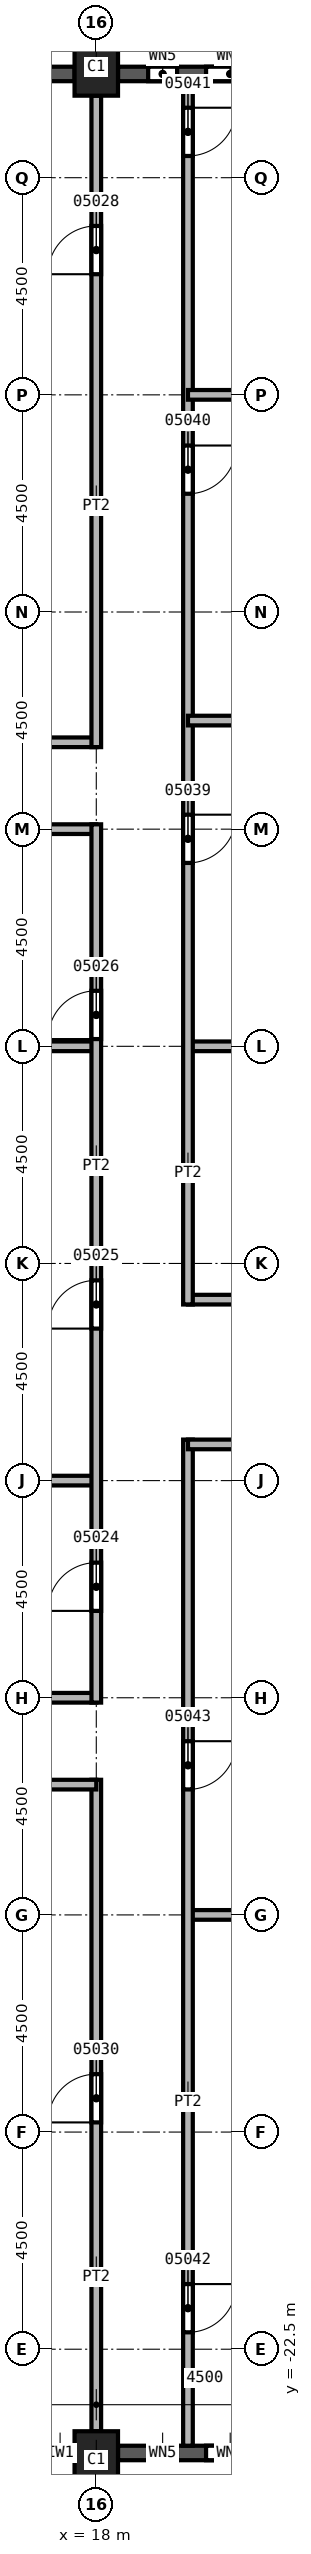
"""IFC4 building model, lengths in metres.
Left out: names, types, materials, properties, quantities, classifications, styles, units other than length and angle.
Written with IfcOpenShell. Run it as: python <this file> out.ifc"""

import sys

from ifc_helpers import new_model, si_unit, direction, frame, frame_2d, origin, origin_2d, place, context, subcontext, project, spatial, rectangle, extrude, element, fill, save


model = new_model("IFC4")
c1 = context("Model", 3, precision=1e-05, world=origin(), true_north=direction((0.0, 1.0)))
c2 = subcontext(c1, "Body", "Model", "MODEL_VIEW")
j1 = project(units=[si_unit("LENGTHUNIT", "METRE"), si_unit("PLANEANGLEUNIT", "RADIAN")], contexts=[c1])
p1 = place(None, origin())
s1 = spatial("IfcSite", under=j1, at=p1, CompositionType="ELEMENT")
p2 = place(p1, origin())
s2 = spatial("IfcBuilding", under=s1, at=p2, CompositionType="ELEMENT")
p3 = place(p2, frame((0.0, 0.0, 112.0)))
s3 = spatial("IfcBuildingStorey", under=s2, at=p3, CompositionType="ELEMENT", Elevation=112.0)
for number, where, z_axis, x_axis in (
    (1, (18.0, 24.8, 0.0), (0.0, 0.0, 1.0), (1.0, 0.0, 0.0)),
    (2, (18.0, -24.8, 0.0), (0.0, 0.0, 1.0), (1.0, 0.0, 0.0)),
):
    element("IfcColumn", number, at=place(p3, frame(where, z_axis=z_axis, x_axis=x_axis)), inside=s3, PredefinedType="COLUMN", context=c2, shape_type="SweptSolid", body=[
        extrude(rectangle(XDim=0.9, YDim=1.2, at=origin_2d()), origin(), (0.0, 0.0, 1.0), 3.7),
    ])
p4 = place(p3, frame((13.95, -24.65, 0.0), z_axis=(0.0, 0.0, 1.0), x_axis=(1.0, 0.0, 0.0)))
e3 = element("IfcWall", 3, at=p4, inside=s3, PredefinedType="SOLIDWALL", context=c2, shape_type="SweptSolid", body=[
    extrude(rectangle(XDim=3.6, YDim=0.3, at=frame_2d((1.8, 0.0))), origin(), (0.0, 0.0, 1.0), 3.1),
])
p5 = place(p4, frame((0.6, 0.0, 0.8)))
e4 = element("IfcOpeningElement", 4, at=p5, cuts=e3, PredefinedType="OPENING", context=c2, shape_type="SweptSolid", body=[
    extrude(rectangle(XDim=2.4, YDim=1.95, at=frame_2d((1.2, 0.975))), frame((0.0, 0.15, 0.0), z_axis=(0.0, -1.0, 0.0), x_axis=(1.0, 0.0, 0.0)), (0.0, 0.0, 1.0), 0.3),
])
p6 = place(p3, frame((18.45, -24.65, 0.0), z_axis=(0.0, 0.0, 1.0), x_axis=(1.0, 0.0, 0.0)))
e5 = element("IfcWall", 5, at=p6, inside=s3, PredefinedType="SOLIDWALL", context=c2, shape_type="SweptSolid", body=[
    extrude(rectangle(XDim=3.6, YDim=0.3, at=frame_2d((1.8, 0.0))), origin(), (0.0, 0.0, 1.0), 3.1),
])
p7 = place(p6, frame((0.625, 0.0, 0.8)))
e6 = element("IfcOpeningElement", 6, at=p7, cuts=e5, PredefinedType="OPENING", context=c2, shape_type="SweptSolid", body=[
    extrude(rectangle(XDim=0.6, YDim=1.95, at=frame_2d((0.3, 0.975))), frame((0.0, 0.15, 0.0), z_axis=(0.0, -1.0, 0.0), x_axis=(1.0, 0.0, 0.0)), (0.0, 0.0, 1.0), 0.3),
])
p8 = place(p6, frame((1.825, 0.0, 0.8)))
e7 = element("IfcOpeningElement", 7, at=p8, cuts=e5, PredefinedType="OPENING", context=c2, shape_type="SweptSolid", body=[
    extrude(rectangle(XDim=1.0, YDim=1.95, at=frame_2d((0.5, 0.975))), frame((0.0, 0.15, 0.0), z_axis=(0.0, -1.0, 0.0), x_axis=(1.0, 0.0, 0.0)), (0.0, 0.0, 1.0), 0.3),
])
p9 = place(p3, frame((22.05, 24.65, 0.0), z_axis=(0.0, 0.0, 1.0), x_axis=(-1.0, 0.0, 0.0)))
e8 = element("IfcWall", 8, at=p9, inside=s3, PredefinedType="SOLIDWALL", context=c2, shape_type="SweptSolid", body=[
    extrude(rectangle(XDim=3.6, YDim=0.3, at=frame_2d((1.8, 0.0))), origin(), (0.0, 0.0, 1.0), 3.1),
])
p10 = place(p9, frame((0.775, 0.0, 0.8)))
e9 = element("IfcOpeningElement", 9, at=p10, cuts=e8, PredefinedType="OPENING", context=c2, shape_type="SweptSolid", body=[
    extrude(rectangle(XDim=1.0, YDim=1.95, at=frame_2d((0.5, 0.975))), frame((0.0, 0.15, 0.0), z_axis=(0.0, -1.0, 0.0), x_axis=(1.0, 0.0, 0.0)), (0.0, 0.0, 1.0), 0.3),
])
p11 = place(p9, frame((2.375, 0.0, 0.8)))
e10 = element("IfcOpeningElement", 10, at=p11, cuts=e8, PredefinedType="OPENING", context=c2, shape_type="SweptSolid", body=[
    extrude(rectangle(XDim=0.6, YDim=1.95, at=frame_2d((0.3, 0.975))), frame((0.0, 0.15, 0.0), z_axis=(0.0, -1.0, 0.0), x_axis=(1.0, 0.0, 0.0)), (0.0, 0.0, 1.0), 0.3),
])
p12 = place(p3, frame((17.55, 24.65, 0.0), z_axis=(0.0, 0.0, 1.0), x_axis=(-1.0, 0.0, 0.0)))
e11 = element("IfcWall", 11, at=p12, inside=s3, PredefinedType="SOLIDWALL", context=c2, shape_type="SweptSolid", body=[
    extrude(rectangle(XDim=3.6, YDim=0.3, at=frame_2d((1.8, 0.0))), origin(), (0.0, 0.0, 1.0), 3.1),
])
p13 = place(p12, frame((0.6, 0.0, 0.8)))
e12 = element("IfcOpeningElement", 12, at=p13, cuts=e11, PredefinedType="OPENING", context=c2, shape_type="SweptSolid", body=[
    extrude(rectangle(XDim=2.4, YDim=1.95, at=frame_2d((1.2, 0.975))), frame((0.0, 0.15, 0.0), z_axis=(0.0, -1.0, 0.0), x_axis=(1.0, 0.0, 0.0)), (0.0, 0.0, 1.0), 0.3),
])
for number, where, z_axis, x_axis in (
    (13, (13.5, -9.0, 0.0), (0.0, 0.0, 1.0), (1.0, 0.0, 0.0)),
    (14, (13.5, -4.5, 0.0), (0.0, 0.0, 1.0), (1.0, 0.0, 0.0)),
    (15, (13.5, 4.5, 0.0), (0.0, 0.0, 1.0), (1.0, 0.0, 0.0)),
    (16, (18.0, 9.0, 0.0), (0.0, 0.0, 1.0), (-1.0, 0.0, 0.0)),
):
    element("IfcWall", number, at=place(p3, frame(where, z_axis=z_axis, x_axis=x_axis)), inside=s3, PredefinedType="PARTITIONING", context=c2, shape_type="SweptSolid", body=[
        extrude(rectangle(XDim=4.5, YDim=0.2, at=frame_2d((2.25, 0.0))), origin(), (0.0, 0.0, 1.0), 3.7),
    ])
p14 = place(p3, frame((14.4, 10.8, 0.0), z_axis=(0.0, 0.0, 1.0), x_axis=(1.0, 0.0, 0.0)))
e17 = element("IfcWall", 17, at=p14, inside=s3, PredefinedType="PARTITIONING", context=c2, shape_type="SweptSolid", body=[
    extrude(rectangle(XDim=3.6, YDim=0.2, at=frame_2d((1.8, 0.0))), origin(), (0.0, 0.0, 1.0), 3.7),
])
p15 = place(p3, frame((18.0, -24.2, 0.0), z_axis=(0.0, 0.0, 1.0), x_axis=(0.0, 1.0, 0.0)))
e18 = element("IfcWall", 18, at=p15, inside=s3, PredefinedType="PARTITIONING", context=c2, shape_type="SweptSolid", body=[
    extrude(rectangle(XDim=13.5, YDim=0.2, at=frame_2d((6.75, 0.0))), origin(), (0.0, 0.0, 1.0), 3.7),
])
p16 = place(p15, frame((6.4, 0.0, 0.0)))
e19 = element("IfcOpeningElement", 19, at=p16, cuts=e18, PredefinedType="OPENING", context=c2, shape_type="SweptSolid", body=[
    extrude(rectangle(XDim=1.0, YDim=2.1, at=frame_2d((0.5, 1.05))), frame((0.0, 0.1, 0.0), z_axis=(0.0, -1.0, 0.0), x_axis=(1.0, 0.0, 0.0)), (0.0, 0.0, 1.0), 0.2),
])
p17 = place(p3, frame((18.0, -10.8, 0.0), z_axis=(0.0, 0.0, 1.0), x_axis=(-1.0, 0.0, 0.0)))
e20 = element("IfcWall", 20, at=p17, inside=s3, PredefinedType="PARTITIONING", context=c2, shape_type="SweptSolid", body=[
    extrude(rectangle(XDim=3.6, YDim=0.2, at=frame_2d((1.8, 0.0))), origin(), (0.0, 0.0, 1.0), 3.7),
])
p18 = place(p3, frame((18.0, -9.1, 0.0), z_axis=(0.0, 0.0, 1.0), x_axis=(0.0, 1.0, 0.0)))
e21 = element("IfcWall", 21, at=p18, inside=s3, PredefinedType="PARTITIONING", context=c2, shape_type="SweptSolid", body=[
    extrude(rectangle(XDim=18.2, YDim=0.2, at=frame_2d((9.1, 0.0))), origin(), (0.0, 0.0, 1.0), 3.7),
])
p19 = place(p18, frame((1.9, 0.0, 0.0)))
e22 = element("IfcOpeningElement", 22, at=p19, cuts=e21, PredefinedType="OPENING", context=c2, shape_type="SweptSolid", body=[
    extrude(rectangle(XDim=1.0, YDim=2.1, at=frame_2d((0.5, 1.05))), frame((0.0, 0.1, 0.0), z_axis=(0.0, -1.0, 0.0), x_axis=(1.0, 0.0, 0.0)), (0.0, 0.0, 1.0), 0.2),
])
p20 = place(p18, frame((7.75, 0.0, 0.0)))
e23 = element("IfcOpeningElement", 23, at=p20, cuts=e21, PredefinedType="OPENING", context=c2, shape_type="SweptSolid", body=[
    extrude(rectangle(XDim=1.0, YDim=2.1, at=frame_2d((0.5, 1.05))), frame((0.0, 0.1, 0.0), z_axis=(0.0, -1.0, 0.0), x_axis=(1.0, 0.0, 0.0)), (0.0, 0.0, 1.0), 0.2),
])
p21 = place(p18, frame((13.75, 0.0, 0.0)))
e24 = element("IfcOpeningElement", 24, at=p21, cuts=e21, PredefinedType="OPENING", context=c2, shape_type="SweptSolid", body=[
    extrude(rectangle(XDim=1.0, YDim=2.1, at=frame_2d((0.5, 1.05))), frame((0.0, 0.1, 0.0), z_axis=(0.0, -1.0, 0.0), x_axis=(1.0, 0.0, 0.0)), (0.0, 0.0, 1.0), 0.2),
])
p22 = place(p3, frame((18.0, 10.7, 0.0), z_axis=(0.0, 0.0, 1.0), x_axis=(0.0, 1.0, 0.0)))
e25 = element("IfcWall", 25, at=p22, inside=s3, PredefinedType="PARTITIONING", context=c2, shape_type="SweptSolid", body=[
    extrude(rectangle(XDim=13.5, YDim=0.2, at=frame_2d((6.75, 0.0))), origin(), (0.0, 0.0, 1.0), 3.7),
])
p23 = place(p22, frame((9.8, 0.0, 0.0)))
e26 = element("IfcOpeningElement", 26, at=p23, cuts=e25, PredefinedType="OPENING", context=c2, shape_type="SweptSolid", body=[
    extrude(rectangle(XDim=1.0, YDim=2.1, at=frame_2d((0.5, 1.05))), frame((0.0, 0.1, 0.0), z_axis=(0.0, -1.0, 0.0), x_axis=(1.0, 0.0, 0.0)), (0.0, 0.0, 1.0), 0.2),
])
p24 = place(p3, frame((19.9, -13.5, 0.0), z_axis=(0.0, 0.0, 1.0), x_axis=(1.0, 0.0, 0.0)))
e27 = element("IfcWall", 27, at=p24, inside=s3, PredefinedType="PARTITIONING", context=c2, shape_type="SweptSolid", body=[
    extrude(rectangle(XDim=7.2, YDim=0.2, at=frame_2d((3.6, 0.0))), origin(), (0.0, 0.0, 1.0), 3.7),
])
p25 = place(p3, frame((19.9, -3.65, 0.0), z_axis=(0.0, 0.0, 1.0), x_axis=(0.0, -1.0, 0.0)))
e28 = element("IfcWall", 28, at=p25, inside=s3, PredefinedType="PARTITIONING", context=c2, shape_type="SweptSolid", body=[
    extrude(rectangle(XDim=20.85, YDim=0.2, at=frame_2d((10.425, 0.0))), origin(), (0.0, 0.0, 1.0), 3.7),
])
p26 = place(p25, frame((17.5, 0.0, 0.0)))
e29 = element("IfcOpeningElement", 29, at=p26, cuts=e28, PredefinedType="OPENING", context=c2, shape_type="SweptSolid", body=[
    extrude(rectangle(XDim=1.0, YDim=2.1, at=frame_2d((0.5, 1.05))), frame((0.0, 0.1, 0.0), z_axis=(0.0, -1.0, 0.0), x_axis=(1.0, 0.0, 0.0)), (0.0, 0.0, 1.0), 0.2),
])
p27 = place(p25, frame((6.25, 0.0, 0.0)))
e30 = element("IfcOpeningElement", 30, at=p27, cuts=e28, PredefinedType="OPENING", context=c2, shape_type="SweptSolid", body=[
    extrude(rectangle(XDim=1.0, YDim=2.1, at=frame_2d((0.5, 1.05))), frame((0.0, 0.1, 0.0), z_axis=(0.0, -1.0, 0.0), x_axis=(1.0, 0.0, 0.0)), (0.0, 0.0, 1.0), 0.2),
])
p28 = place(p3, frame((19.9, -0.75, 0.0), z_axis=(0.0, 0.0, 1.0), x_axis=(1.0, 0.0, 0.0)))
e31 = element("IfcWall", 31, at=p28, inside=s3, PredefinedType="PARTITIONING", context=c2, shape_type="SweptSolid", body=[
    extrude(rectangle(XDim=13.95, YDim=0.2, at=frame_2d((6.975, 0.0))), origin(), (0.0, 0.0, 1.0), 3.7),
])
p29 = place(p28, frame((3.4, 0.0, 0.0)))
e32 = element("IfcOpeningElement", 32, at=p29, cuts=e31, PredefinedType="OPENING", context=c2, shape_type="SweptSolid", body=[
    extrude(rectangle(XDim=1.0, YDim=2.1, at=frame_2d((0.5, 1.05))), frame((0.0, 0.1, 0.0), z_axis=(0.0, -1.0, 0.0), x_axis=(1.0, 0.0, 0.0)), (0.0, 0.0, 1.0), 0.2),
])
p30 = place(p3, frame((19.9, 4.5, 0.0), z_axis=(0.0, 0.0, 1.0), x_axis=(1.0, 0.0, 0.0)))
e33 = element("IfcWall", 33, at=p30, inside=s3, PredefinedType="PARTITIONING", context=c2, shape_type="SweptSolid", body=[
    extrude(rectangle(XDim=7.2, YDim=0.2, at=frame_2d((3.6, 0.0))), origin(), (0.0, 0.0, 1.0), 3.7),
])
p31 = place(p3, frame((19.9, 24.5, 0.0), z_axis=(0.0, 0.0, 1.0), x_axis=(0.0, -1.0, 0.0)))
e34 = element("IfcWall", 34, at=p31, inside=s3, PredefinedType="PARTITIONING", context=c2, shape_type="SweptSolid", body=[
    extrude(rectangle(XDim=25.35, YDim=0.2, at=frame_2d((12.675, 0.0))), origin(), (0.0, 0.0, 1.0), 3.7),
])
p32 = place(p31, frame((15.2, 0.0, 0.0)))
e35 = element("IfcOpeningElement", 35, at=p32, cuts=e34, PredefinedType="OPENING", context=c2, shape_type="SweptSolid", body=[
    extrude(rectangle(XDim=1.0, YDim=2.1, at=frame_2d((0.5, 1.05))), frame((0.0, 0.1, 0.0), z_axis=(0.0, -1.0, 0.0), x_axis=(1.0, 0.0, 0.0)), (0.0, 0.0, 1.0), 0.2),
])
p33 = place(p31, frame((7.55, 0.0, 0.0)))
e36 = element("IfcOpeningElement", 36, at=p33, cuts=e34, PredefinedType="OPENING", context=c2, shape_type="SweptSolid", body=[
    extrude(rectangle(XDim=1.0, YDim=2.1, at=frame_2d((0.5, 1.05))), frame((0.0, 0.1, 0.0), z_axis=(0.0, -1.0, 0.0), x_axis=(1.0, 0.0, 0.0)), (0.0, 0.0, 1.0), 0.2),
])
p34 = place(p31, frame((0.55, 0.0, 0.0)))
e37 = element("IfcOpeningElement", 37, at=p34, cuts=e34, PredefinedType="OPENING", context=c2, shape_type="SweptSolid", body=[
    extrude(rectangle(XDim=1.0, YDim=2.1, at=frame_2d((0.5, 1.05))), frame((0.0, 0.1, 0.0), z_axis=(0.0, -1.0, 0.0), x_axis=(1.0, 0.0, 0.0)), (0.0, 0.0, 1.0), 0.2),
])
p35 = place(p3, frame((19.9, 11.25, 0.0), z_axis=(0.0, 0.0, 1.0), x_axis=(1.0, 0.0, 0.0)))
e38 = element("IfcWall", 38, at=p35, inside=s3, PredefinedType="PARTITIONING", context=c2, shape_type="SweptSolid", body=[
    extrude(rectangle(XDim=7.2, YDim=0.2, at=frame_2d((3.6, 0.0))), origin(), (0.0, 0.0, 1.0), 3.7),
])
p36 = place(p3, frame((19.9, 18.0, 0.0), z_axis=(0.0, 0.0, 1.0), x_axis=(1.0, 0.0, 0.0)))
e39 = element("IfcWall", 39, at=p36, inside=s3, PredefinedType="PARTITIONING", context=c2, shape_type="SweptSolid", body=[
    extrude(rectangle(XDim=4.25, YDim=0.2, at=frame_2d((2.125, 0.0))), origin(), (0.0, 0.0, 1.0), 3.7),
])
p37 = place(p3, frame((33.85, -3.75, 0.0), z_axis=(0.0, 0.0, 1.0), x_axis=(-1.0, 0.0, 0.0)))
e40 = element("IfcWall", 40, at=p37, inside=s3, PredefinedType="PARTITIONING", context=c2, shape_type="SweptSolid", body=[
    extrude(rectangle(XDim=13.95, YDim=0.2, at=frame_2d((6.975, 0.0))), origin(), (0.0, 0.0, 1.0), 3.7),
])
p38 = place(p19, origin())
e41 = element("IfcDoor", 41, at=p38, inside=s3, OperationType="SINGLE_SWING_LEFT", PredefinedType="DOOR", context=c2, shape_type="SweptSolid", body=[
    extrude(rectangle(XDim=1.0, YDim=2.1, at=frame_2d((0.5, 1.05))), frame((0.0, 0.025, 0.0), z_axis=(0.0, -1.0, 0.0), x_axis=(1.0, 0.0, 0.0)), (0.0, 0.0, 1.0), 0.05),
])
fill(e22, e41)
p39 = place(p20, origin())
e42 = element("IfcDoor", 42, at=p39, inside=s3, OperationType="SINGLE_SWING_RIGHT", PredefinedType="DOOR", context=c2, shape_type="SweptSolid", body=[
    extrude(rectangle(XDim=1.0, YDim=2.1, at=frame_2d((0.5, 1.05))), frame((0.0, 0.025, 0.0), z_axis=(0.0, -1.0, 0.0), x_axis=(1.0, 0.0, 0.0)), (0.0, 0.0, 1.0), 0.05),
])
fill(e23, e42)
p40 = place(p21, origin())
e43 = element("IfcDoor", 43, at=p40, inside=s3, OperationType="SINGLE_SWING_LEFT", PredefinedType="DOOR", context=c2, shape_type="SweptSolid", body=[
    extrude(rectangle(XDim=1.0, YDim=2.1, at=frame_2d((0.5, 1.05))), frame((0.0, 0.025, 0.0), z_axis=(0.0, -1.0, 0.0), x_axis=(1.0, 0.0, 0.0)), (0.0, 0.0, 1.0), 0.05),
])
fill(e24, e43)
p41 = place(p23, origin())
e44 = element("IfcDoor", 44, at=p41, inside=s3, OperationType="SINGLE_SWING_LEFT", PredefinedType="DOOR", context=c2, shape_type="SweptSolid", body=[
    extrude(rectangle(XDim=1.0, YDim=2.1, at=frame_2d((0.5, 1.05))), frame((0.0, 0.025, 0.0), z_axis=(0.0, -1.0, 0.0), x_axis=(1.0, 0.0, 0.0)), (0.0, 0.0, 1.0), 0.05),
])
fill(e26, e44)
p42 = place(p16, origin())
e45 = element("IfcDoor", 45, at=p42, inside=s3, OperationType="SINGLE_SWING_LEFT", PredefinedType="DOOR", context=c2, shape_type="SweptSolid", body=[
    extrude(rectangle(XDim=1.0, YDim=2.1, at=frame_2d((0.5, 1.05))), frame((0.0, 0.025, 0.0), z_axis=(0.0, -1.0, 0.0), x_axis=(1.0, 0.0, 0.0)), (0.0, 0.0, 1.0), 0.05),
])
fill(e19, e45)
p43 = place(p32, origin())
e46 = element("IfcDoor", 46, at=p43, inside=s3, OperationType="SINGLE_SWING_RIGHT", PredefinedType="DOOR", context=c2, shape_type="SweptSolid", body=[
    extrude(rectangle(XDim=1.0, YDim=2.1, at=frame_2d((0.5, 1.05))), frame((0.0, 0.025, 0.0), z_axis=(0.0, -1.0, 0.0), x_axis=(1.0, 0.0, 0.0)), (0.0, 0.0, 1.0), 0.05),
])
fill(e35, e46)
p44 = place(p33, origin())
e47 = element("IfcDoor", 47, at=p44, inside=s3, OperationType="SINGLE_SWING_LEFT", PredefinedType="DOOR", context=c2, shape_type="SweptSolid", body=[
    extrude(rectangle(XDim=1.0, YDim=2.1, at=frame_2d((0.5, 1.05))), frame((0.0, 0.025, 0.0), z_axis=(0.0, -1.0, 0.0), x_axis=(1.0, 0.0, 0.0)), (0.0, 0.0, 1.0), 0.05),
])
fill(e36, e47)
p45 = place(p34, origin())
e48 = element("IfcDoor", 48, at=p45, inside=s3, OperationType="SINGLE_SWING_RIGHT", PredefinedType="DOOR", context=c2, shape_type="SweptSolid", body=[
    extrude(rectangle(XDim=1.0, YDim=2.1, at=frame_2d((0.5, 1.05))), frame((0.0, 0.025, 0.0), z_axis=(0.0, -1.0, 0.0), x_axis=(1.0, 0.0, 0.0)), (0.0, 0.0, 1.0), 0.05),
])
fill(e37, e48)
p46 = place(p26, origin())
e49 = element("IfcDoor", 49, at=p46, inside=s3, OperationType="SINGLE_SWING_LEFT", PredefinedType="DOOR", context=c2, shape_type="SweptSolid", body=[
    extrude(rectangle(XDim=1.0, YDim=2.1, at=frame_2d((0.5, 1.05))), frame((0.0, 0.025, 0.0), z_axis=(0.0, -1.0, 0.0), x_axis=(1.0, 0.0, 0.0)), (0.0, 0.0, 1.0), 0.05),
])
fill(e29, e49)
p47 = place(p27, origin())
e50 = element("IfcDoor", 50, at=p47, inside=s3, OperationType="SINGLE_SWING_RIGHT", PredefinedType="DOOR", context=c2, shape_type="SweptSolid", body=[
    extrude(rectangle(XDim=1.0, YDim=2.1, at=frame_2d((0.5, 1.05))), frame((0.0, 0.025, 0.0), z_axis=(0.0, -1.0, 0.0), x_axis=(1.0, 0.0, 0.0)), (0.0, 0.0, 1.0), 0.05),
])
fill(e30, e50)
p48 = place(p7, origin())
e51 = element("IfcWindow", 51, at=p48, inside=s3, PartitioningType="SINGLE_PANEL", PredefinedType="WINDOW", context=c2, shape_type="SweptSolid", body=[
    extrude(rectangle(XDim=0.6, YDim=1.95, at=frame_2d((0.3, 0.975))), frame((0.0, 0.03, 0.0), z_axis=(0.0, -1.0, 0.0), x_axis=(1.0, 0.0, 0.0)), (0.0, 0.0, 1.0), 0.06),
])
fill(e6, e51)
p49 = place(p8, origin())
e52 = element("IfcWindow", 52, at=p49, inside=s3, PartitioningType="SINGLE_PANEL", PredefinedType="WINDOW", context=c2, shape_type="SweptSolid", body=[
    extrude(rectangle(XDim=1.0, YDim=1.95, at=frame_2d((0.5, 0.975))), frame((0.0, 0.03, 0.0), z_axis=(0.0, -1.0, 0.0), x_axis=(1.0, 0.0, 0.0)), (0.0, 0.0, 1.0), 0.06),
])
fill(e7, e52)
p50 = place(p10, origin())
e53 = element("IfcWindow", 53, at=p50, inside=s3, PartitioningType="SINGLE_PANEL", PredefinedType="WINDOW", context=c2, shape_type="SweptSolid", body=[
    extrude(rectangle(XDim=1.0, YDim=1.95, at=frame_2d((0.5, 0.975))), frame((0.0, 0.03, 0.0), z_axis=(0.0, -1.0, 0.0), x_axis=(1.0, 0.0, 0.0)), (0.0, 0.0, 1.0), 0.06),
])
fill(e9, e53)
p51 = place(p11, origin())
e54 = element("IfcWindow", 54, at=p51, inside=s3, PartitioningType="SINGLE_PANEL", PredefinedType="WINDOW", context=c2, shape_type="SweptSolid", body=[
    extrude(rectangle(XDim=0.6, YDim=1.95, at=frame_2d((0.3, 0.975))), frame((0.0, 0.03, 0.0), z_axis=(0.0, -1.0, 0.0), x_axis=(1.0, 0.0, 0.0)), (0.0, 0.0, 1.0), 0.06),
])
fill(e10, e54)
save(model, sys.argv[1])
